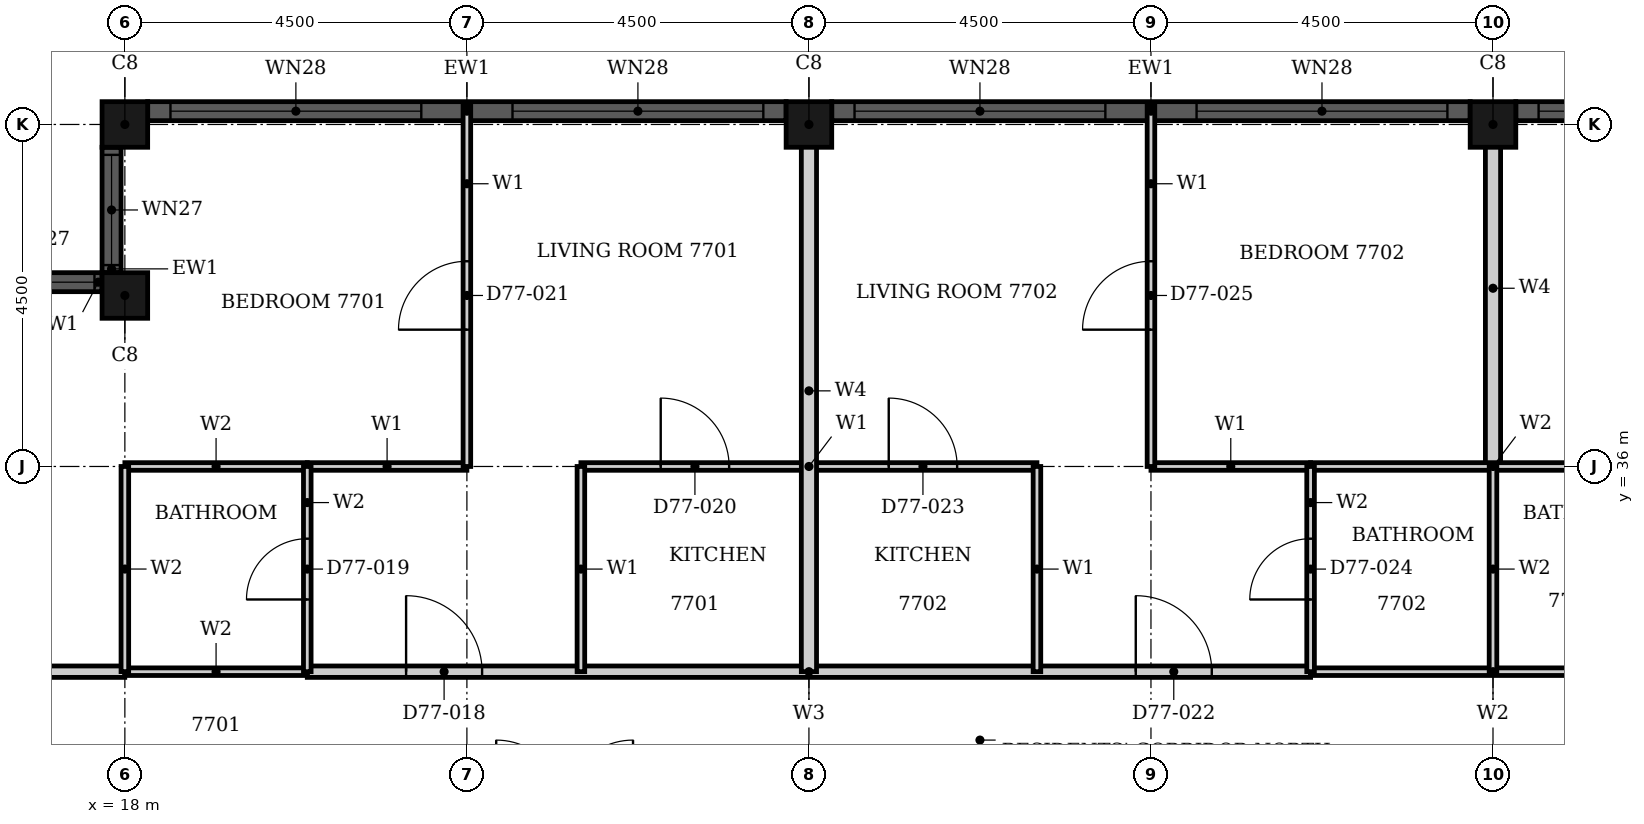
"""IFC4 building model, lengths in metres.
Left out: names, types, materials, properties, quantities, classifications, styles, units other than length and angle.
Written with IfcOpenShell. Run it as: python <this file> out.ifc"""

import sys

from ifc_helpers import new_model, si_unit, direction, frame, frame_2d, origin, origin_2d, place, context, subcontext, project, spatial, rectangle, hollow_rectangle, extrude, element, fill, save


model = new_model("IFC4")
c1 = context("Model", 3, precision=1e-05, world=origin(), true_north=direction((0.0, 1.0)))
c2 = subcontext(c1, "Body", "Model", "MODEL_VIEW")
j1 = project(units=[si_unit("LENGTHUNIT", "METRE"), si_unit("PLANEANGLEUNIT", "RADIAN")], contexts=[c1])
p1 = place(None, origin())
s1 = spatial("IfcSite", under=j1, at=p1, CompositionType="ELEMENT")
p2 = place(p1, origin())
s2 = spatial("IfcBuilding", under=s1, at=p2, CompositionType="ELEMENT")
p3 = place(p2, frame((0.0, 0.0, 301.9)))
s3 = spatial("IfcBuildingStorey", under=s2, at=p3, CompositionType="ELEMENT", Elevation=301.9)
for number, where, z_axis, x_axis in (
    (1, (36.0, 40.5, 0.0), (0.0, 0.0, 1.0), (1.0, 0.0, 0.0)),
    (2, (27.0, 40.5, 0.0), (0.0, 0.0, 1.0), (1.0, 0.0, 0.0)),
    (3, (18.0, 40.5, 0.0), (0.0, 0.0, 1.0), (1.0, 0.0, 0.0)),
    (4, (18.0, 38.25, 0.0), (0.0, 0.0, 1.0), (1.0, 0.0, 0.0)),
):
    element("IfcColumn", number, at=place(p3, frame(where, z_axis=z_axis, x_axis=x_axis)), inside=s3, PredefinedType="COLUMN", context=c2, shape_type="SweptSolid", body=[
        extrude(hollow_rectangle(XDim=0.6, YDim=0.6, WallThickness=0.02, at=origin_2d()), origin(), (0.0, 0.0, 1.0), 3.7),
    ])
p4 = place(p3, frame((44.7, 40.675, 0.0), z_axis=(0.0, 0.0, 1.0), x_axis=(-1.0, 0.0, 0.0)))
e5 = element("IfcWall", 5, at=p4, inside=s3, PredefinedType="SOLIDWALL", context=c2, shape_type="SweptSolid", body=[
    extrude(rectangle(XDim=8.4, YDim=0.25, at=frame_2d((4.2, 0.0))), origin(), (0.0, 0.0, 1.0), 3.7),
])
p5 = place(p4, frame((0.3, 0.0, 0.45)))
e6 = element("IfcOpeningElement", 6, at=p5, cuts=e5, PredefinedType="OPENING", context=c2, shape_type="SweptSolid", body=[
    extrude(rectangle(XDim=3.3, YDim=1.8, at=frame_2d((1.65, 0.9))), frame((0.0, 0.135, 0.0), z_axis=(0.0, -1.0, 0.0), x_axis=(1.0, 0.0, 0.0)), (0.0, 0.0, 1.0), 0.27),
])
p6 = place(p4, frame((4.8, 0.0, 0.45)))
e7 = element("IfcOpeningElement", 7, at=p6, cuts=e5, PredefinedType="OPENING", context=c2, shape_type="SweptSolid", body=[
    extrude(rectangle(XDim=3.3, YDim=1.8, at=frame_2d((1.65, 0.9))), frame((0.0, 0.135, 0.0), z_axis=(0.0, -1.0, 0.0), x_axis=(1.0, 0.0, 0.0)), (0.0, 0.0, 1.0), 0.27),
])
p7 = place(p3, frame((35.7, 40.675, 0.0), z_axis=(0.0, 0.0, 1.0), x_axis=(-1.0, 0.0, 0.0)))
e8 = element("IfcWall", 8, at=p7, inside=s3, PredefinedType="SOLIDWALL", context=c2, shape_type="SweptSolid", body=[
    extrude(rectangle(XDim=8.4, YDim=0.25, at=frame_2d((4.2, 0.0))), origin(), (0.0, 0.0, 1.0), 3.7),
])
p8 = place(p7, frame((0.3, 0.0, 0.45)))
e9 = element("IfcOpeningElement", 9, at=p8, cuts=e8, PredefinedType="OPENING", context=c2, shape_type="SweptSolid", body=[
    extrude(rectangle(XDim=3.3, YDim=1.8, at=frame_2d((1.65, 0.9))), frame((0.0, 0.135, 0.0), z_axis=(0.0, -1.0, 0.0), x_axis=(1.0, 0.0, 0.0)), (0.0, 0.0, 1.0), 0.27),
])
p9 = place(p7, frame((4.8, 0.0, 0.45)))
e10 = element("IfcOpeningElement", 10, at=p9, cuts=e8, PredefinedType="OPENING", context=c2, shape_type="SweptSolid", body=[
    extrude(rectangle(XDim=3.3, YDim=1.8, at=frame_2d((1.65, 0.9))), frame((0.0, 0.135, 0.0), z_axis=(0.0, -1.0, 0.0), x_axis=(1.0, 0.0, 0.0)), (0.0, 0.0, 1.0), 0.27),
])
p10 = place(p3, frame((26.7, 40.675, 0.0), z_axis=(0.0, 0.0, 1.0), x_axis=(-1.0, 0.0, 0.0)))
e11 = element("IfcWall", 11, at=p10, inside=s3, PredefinedType="SOLIDWALL", context=c2, shape_type="SweptSolid", body=[
    extrude(rectangle(XDim=8.4, YDim=0.25, at=frame_2d((4.2, 0.0))), origin(), (0.0, 0.0, 1.0), 3.7),
])
p11 = place(p10, frame((0.3, 0.0, 0.45)))
e12 = element("IfcOpeningElement", 12, at=p11, cuts=e11, PredefinedType="OPENING", context=c2, shape_type="SweptSolid", body=[
    extrude(rectangle(XDim=3.3, YDim=1.8, at=frame_2d((1.65, 0.9))), frame((0.0, 0.135, 0.0), z_axis=(0.0, -1.0, 0.0), x_axis=(1.0, 0.0, 0.0)), (0.0, 0.0, 1.0), 0.27),
])
p12 = place(p10, frame((4.8, 0.0, 0.45)))
e13 = element("IfcOpeningElement", 13, at=p12, cuts=e11, PredefinedType="OPENING", context=c2, shape_type="SweptSolid", body=[
    extrude(rectangle(XDim=3.3, YDim=1.8, at=frame_2d((1.65, 0.9))), frame((0.0, 0.135, 0.0), z_axis=(0.0, -1.0, 0.0), x_axis=(1.0, 0.0, 0.0)), (0.0, 0.0, 1.0), 0.27),
])
p13 = place(p3, frame((17.825, 40.2, 0.0), z_axis=(0.0, 0.0, 1.0), x_axis=(0.0, -1.0, 0.0)))
e14 = element("IfcWall", 14, at=p13, inside=s3, PredefinedType="SOLIDWALL", context=c2, shape_type="SweptSolid", body=[
    extrude(rectangle(XDim=1.65, YDim=0.25, at=frame_2d((0.825, 0.0))), origin(), (0.0, 0.0, 1.0), 3.7),
])
p14 = place(p13, frame((0.1, 0.0, 0.9)))
e15 = element("IfcOpeningElement", 15, at=p14, cuts=e14, PredefinedType="OPENING", context=c2, shape_type="SweptSolid", body=[
    extrude(rectangle(XDim=1.45, YDim=1.35, at=frame_2d((0.725, 0.675))), frame((0.0, 0.135, 0.0), z_axis=(0.0, -1.0, 0.0), x_axis=(1.0, 0.0, 0.0)), (0.0, 0.0, 1.0), 0.27),
])
p15 = place(p3, frame((17.7, 38.425, 0.0), z_axis=(0.0, 0.0, 1.0), x_axis=(-1.0, 0.0, 0.0)))
e16 = element("IfcWall", 16, at=p15, inside=s3, PredefinedType="SOLIDWALL", context=c2, shape_type="SweptSolid", body=[
    extrude(rectangle(XDim=1.65, YDim=0.25, at=frame_2d((0.825, 0.0))), origin(), (0.0, 0.0, 1.0), 3.7),
])
p16 = place(p15, frame((0.1, 0.0, 0.9)))
e17 = element("IfcOpeningElement", 17, at=p16, cuts=e16, PredefinedType="OPENING", context=c2, shape_type="SweptSolid", body=[
    extrude(rectangle(XDim=1.45, YDim=1.35, at=frame_2d((0.725, 0.675))), frame((0.0, 0.135, 0.0), z_axis=(0.0, -1.0, 0.0), x_axis=(1.0, 0.0, 0.0)), (0.0, 0.0, 1.0), 0.27),
])
p17 = place(p3, frame((13.45, 33.3, 0.0), z_axis=(0.0, 0.0, 1.0), x_axis=(1.0, 0.0, 0.0)))
e18 = element("IfcWall", 18, at=p17, inside=s3, PredefinedType="PARTITIONING", context=c2, shape_type="SweptSolid", body=[
    extrude(rectangle(XDim=4.549, YDim=0.15, at=frame_2d((2.274, 0.0))), origin(), (0.0, 0.0, 1.0), 3.2),
])
p18 = place(p3, frame((20.4, 33.3, 0.0), z_axis=(0.0, 0.0, 1.0), x_axis=(1.0, 0.0, 0.0)))
e19 = element("IfcWall", 19, at=p18, inside=s3, PredefinedType="PARTITIONING", context=c2, shape_type="SweptSolid", body=[
    extrude(rectangle(XDim=13.2, YDim=0.15, at=frame_2d((6.6, 0.0))), origin(), (0.0, 0.0, 1.0), 3.2),
])
p19 = place(p18, frame((1.3, 0.0, 0.0)))
e20 = element("IfcOpeningElement", 20, at=p19, cuts=e19, PredefinedType="OPENING", context=c2, shape_type="SweptSolid", body=[
    extrude(rectangle(XDim=1.0, YDim=2.2, at=frame_2d((0.5, 1.1))), frame((0.0, 0.085, 0.0), z_axis=(0.0, -1.0, 0.0), x_axis=(1.0, 0.0, 0.0)), (0.0, 0.0, 1.0), 0.17),
])
p20 = place(p18, frame((10.9, 0.0, 0.0)))
e21 = element("IfcOpeningElement", 21, at=p20, cuts=e19, PredefinedType="OPENING", context=c2, shape_type="SweptSolid", body=[
    extrude(rectangle(XDim=1.0, YDim=2.2, at=frame_2d((0.5, 1.1))), frame((0.0, 0.085, 0.0), z_axis=(0.0, -1.0, 0.0), x_axis=(1.0, 0.0, 0.0)), (0.0, 0.0, 1.0), 0.17),
])
p21 = place(p3, frame((20.4, 36.0, 0.0), z_axis=(0.0, 0.0, 1.0), x_axis=(1.0, 0.0, 0.0)))
e22 = element("IfcWall", 22, at=p21, inside=s3, PredefinedType="PARTITIONING", context=c2, shape_type="SweptSolid", body=[
    extrude(rectangle(XDim=2.1, YDim=0.1, at=frame_2d((1.05, 0.0))), origin(), (0.0, 0.0, 1.0), 3.2),
])
p22 = place(p3, frame((24.0, 36.0, 0.0), z_axis=(0.0, 0.0, 1.0), x_axis=(1.0, 0.0, 0.0)))
e23 = element("IfcWall", 23, at=p22, inside=s3, PredefinedType="PARTITIONING", context=c2, shape_type="SweptSolid", body=[
    extrude(rectangle(XDim=6.0, YDim=0.1, at=frame_2d((3.0, 0.0))), origin(), (0.0, 0.0, 1.0), 3.2),
])
p23 = place(p22, frame((1.05, 0.0, 0.0)))
e24 = element("IfcOpeningElement", 24, at=p23, cuts=e23, PredefinedType="OPENING", context=c2, shape_type="SweptSolid", body=[
    extrude(rectangle(XDim=0.9, YDim=2.1, at=frame_2d((0.45, 1.05))), frame((0.0, 0.06, 0.0), z_axis=(0.0, -1.0, 0.0), x_axis=(1.0, 0.0, 0.0)), (0.0, 0.0, 1.0), 0.12),
])
p24 = place(p22, frame((4.05, 0.0, 0.0)))
e25 = element("IfcOpeningElement", 25, at=p24, cuts=e23, PredefinedType="OPENING", context=c2, shape_type="SweptSolid", body=[
    extrude(rectangle(XDim=0.9, YDim=2.1, at=frame_2d((0.45, 1.05))), frame((0.0, 0.06, 0.0), z_axis=(0.0, -1.0, 0.0), x_axis=(1.0, 0.0, 0.0)), (0.0, 0.0, 1.0), 0.12),
])
p25 = place(p3, frame((31.5, 36.0, 0.0), z_axis=(0.0, 0.0, 1.0), x_axis=(1.0, 0.0, 0.0)))
e26 = element("IfcWall", 26, at=p25, inside=s3, PredefinedType="PARTITIONING", context=c2, shape_type="SweptSolid", body=[
    extrude(rectangle(XDim=2.1, YDim=0.1, at=frame_2d((1.05, 0.0))), origin(), (0.0, 0.0, 1.0), 3.2),
])
p26 = place(p3, frame((22.5, 36.0, 0.0), z_axis=(0.0, 0.0, 1.0), x_axis=(0.0, 1.0, 0.0)))
e27 = element("IfcWall", 27, at=p26, inside=s3, PredefinedType="PARTITIONING", context=c2, shape_type="SweptSolid", body=[
    extrude(rectangle(XDim=4.74, YDim=0.1, at=frame_2d((2.37, 0.0))), origin(), (0.0, 0.0, 1.0), 3.2),
])
p27 = place(p26, frame((1.8, 0.0, 0.0)))
e28 = element("IfcOpeningElement", 28, at=p27, cuts=e27, PredefinedType="OPENING", context=c2, shape_type="SweptSolid", body=[
    extrude(rectangle(XDim=0.9, YDim=2.1, at=frame_2d((0.45, 1.05))), frame((0.0, 0.06, 0.0), z_axis=(0.0, -1.0, 0.0), x_axis=(1.0, 0.0, 0.0)), (0.0, 0.0, 1.0), 0.12),
])
for number, where, z_axis, x_axis in (
    (29, (24.0, 33.3, 0.0), (0.0, 0.0, 1.0), (0.0, 1.0, 0.0)),
    (30, (30.0, 33.3, 0.0), (0.0, 0.0, 1.0), (0.0, 1.0, 0.0)),
):
    element("IfcWall", number, at=place(p3, frame(where, z_axis=z_axis, x_axis=x_axis)), inside=s3, PredefinedType="PARTITIONING", context=c2, shape_type="SweptSolid", body=[
        extrude(rectangle(XDim=2.7, YDim=0.1, at=frame_2d((1.35, 0.0))), origin(), (0.0, 0.0, 1.0), 3.2),
    ])
p28 = place(p3, frame((31.5, 36.0, 0.0), z_axis=(0.0, 0.0, 1.0), x_axis=(0.0, 1.0, 0.0)))
e31 = element("IfcWall", 31, at=p28, inside=s3, PredefinedType="PARTITIONING", context=c2, shape_type="SweptSolid", body=[
    extrude(rectangle(XDim=4.74, YDim=0.1, at=frame_2d((2.37, 0.0))), origin(), (0.0, 0.0, 1.0), 3.2),
])
p29 = place(p28, frame((1.8, 0.0, 0.0)))
e32 = element("IfcOpeningElement", 32, at=p29, cuts=e31, PredefinedType="OPENING", context=c2, shape_type="SweptSolid", body=[
    extrude(rectangle(XDim=0.9, YDim=2.1, at=frame_2d((0.45, 1.05))), frame((0.0, 0.06, 0.0), z_axis=(0.0, -1.0, 0.0), x_axis=(1.0, 0.0, 0.0)), (0.0, 0.0, 1.0), 0.12),
])
p30 = place(p3, frame((27.0, 33.3, 0.0), z_axis=(0.0, 0.0, 1.0), x_axis=(0.0, 1.0, 0.0)))
e33 = element("IfcWall", 33, at=p30, inside=s3, PredefinedType="PARTITIONING", context=c2, shape_type="SweptSolid", body=[
    extrude(rectangle(XDim=7.39, YDim=0.2, at=frame_2d((3.695, 0.0))), origin(), (0.0, 0.0, 1.0), 3.2),
])
p31 = place(p3, frame((36.0, 36.0, 0.0), z_axis=(0.0, 0.0, 1.0), x_axis=(0.0, 1.0, 0.0)))
e34 = element("IfcWall", 34, at=p31, inside=s3, PredefinedType="PARTITIONING", context=c2, shape_type="SweptSolid", body=[
    extrude(rectangle(XDim=4.69, YDim=0.2, at=frame_2d((2.345, 0.0))), origin(), (0.0, 0.0, 1.0), 3.2),
])
p32 = place(p3, frame((18.0, 33.3, 0.0), z_axis=(0.0, 0.0, 1.0), x_axis=(1.0, 0.0, 0.0)))
e35 = element("IfcWall", 35, at=p32, inside=s3, PredefinedType="PARTITIONING", context=c2, shape_type="SweptSolid", body=[
    extrude(rectangle(XDim=2.4, YDim=0.1, at=frame_2d((1.2, 0.0))), origin(), (0.0, 0.0, 1.0), 3.2),
])
p33 = place(p3, frame((33.6, 33.3, 0.0), z_axis=(0.0, 0.0, 1.0), x_axis=(1.0, 0.0, 0.0)))
e36 = element("IfcWall", 36, at=p33, inside=s3, PredefinedType="PARTITIONING", context=c2, shape_type="SweptSolid", body=[
    extrude(rectangle(XDim=4.8, YDim=0.1, at=frame_2d((2.4, 0.0))), origin(), (0.0, 0.0, 1.0), 3.2),
])
p34 = place(p3, frame((18.0, 36.0, 0.0), z_axis=(0.0, 0.0, 1.0), x_axis=(1.0, 0.0, 0.0)))
e37 = element("IfcWall", 37, at=p34, inside=s3, PredefinedType="PARTITIONING", context=c2, shape_type="SweptSolid", body=[
    extrude(rectangle(XDim=2.4, YDim=0.1, at=frame_2d((1.2, 0.0))), origin(), (0.0, 0.0, 1.0), 3.2),
])
p35 = place(p3, frame((33.6, 36.0, 0.0), z_axis=(0.0, 0.0, 1.0), x_axis=(1.0, 0.0, 0.0)))
e38 = element("IfcWall", 38, at=p35, inside=s3, PredefinedType="PARTITIONING", context=c2, shape_type="SweptSolid", body=[
    extrude(rectangle(XDim=4.8, YDim=0.1, at=frame_2d((2.4, 0.0))), origin(), (0.0, 0.0, 1.0), 3.2),
])
p36 = place(p3, frame((18.0, 33.301, 0.0), z_axis=(0.0, 0.0, 1.0), x_axis=(0.0, 1.0, 0.0)))
e39 = element("IfcWall", 39, at=p36, inside=s3, PredefinedType="PARTITIONING", context=c2, shape_type="SweptSolid", body=[
    extrude(rectangle(XDim=2.699, YDim=0.1, at=frame_2d((1.35, 0.0))), origin(), (0.0, 0.0, 1.0), 3.2),
])
p37 = place(p3, frame((20.4, 33.3, 0.0), z_axis=(0.0, 0.0, 1.0), x_axis=(0.0, 1.0, 0.0)))
e40 = element("IfcWall", 40, at=p37, inside=s3, PredefinedType="PARTITIONING", context=c2, shape_type="SweptSolid", body=[
    extrude(rectangle(XDim=2.7, YDim=0.1, at=frame_2d((1.35, 0.0))), origin(), (0.0, 0.0, 1.0), 3.2),
])
p38 = place(p37, frame((0.95, 0.0, 0.0)))
e41 = element("IfcOpeningElement", 41, at=p38, cuts=e40, PredefinedType="OPENING", context=c2, shape_type="SweptSolid", body=[
    extrude(rectangle(XDim=0.8, YDim=2.1, at=frame_2d((0.4, 1.05))), frame((0.0, 0.06, 0.0), z_axis=(0.0, -1.0, 0.0), x_axis=(1.0, 0.0, 0.0)), (0.0, 0.0, 1.0), 0.12),
])
p39 = place(p3, frame((33.6, 33.3, 0.0), z_axis=(0.0, 0.0, 1.0), x_axis=(0.0, 1.0, 0.0)))
e42 = element("IfcWall", 42, at=p39, inside=s3, PredefinedType="PARTITIONING", context=c2, shape_type="SweptSolid", body=[
    extrude(rectangle(XDim=2.7, YDim=0.1, at=frame_2d((1.35, 0.0))), origin(), (0.0, 0.0, 1.0), 3.2),
])
p40 = place(p39, frame((0.95, 0.0, 0.0)))
e43 = element("IfcOpeningElement", 43, at=p40, cuts=e42, PredefinedType="OPENING", context=c2, shape_type="SweptSolid", body=[
    extrude(rectangle(XDim=0.8, YDim=2.1, at=frame_2d((0.4, 1.05))), frame((0.0, 0.06, 0.0), z_axis=(0.0, -1.0, 0.0), x_axis=(1.0, 0.0, 0.0)), (0.0, 0.0, 1.0), 0.12),
])
p41 = place(p3, frame((36.0, 33.3, 0.0), z_axis=(0.0, 0.0, 1.0), x_axis=(0.0, 1.0, 0.0)))
e44 = element("IfcWall", 44, at=p41, inside=s3, PredefinedType="PARTITIONING", context=c2, shape_type="SweptSolid", body=[
    extrude(rectangle(XDim=2.7, YDim=0.1, at=frame_2d((1.35, 0.0))), origin(), (0.0, 0.0, 1.0), 3.2),
])
p42 = place(p6, origin())
e45 = element("IfcWindow", 45, at=p42, inside=s3, PartitioningType="SINGLE_PANEL", PredefinedType="WINDOW", context=c2, shape_type="SweptSolid", body=[
    extrude(rectangle(XDim=3.3, YDim=1.8, at=frame_2d((1.65, 0.9))), frame((0.0, 0.03, 0.0), z_axis=(0.0, -1.0, 0.0), x_axis=(1.0, 0.0, 0.0)), (0.0, 0.0, 1.0), 0.06),
])
fill(e7, e45)
p43 = place(p8, origin())
e46 = element("IfcWindow", 46, at=p43, inside=s3, PartitioningType="SINGLE_PANEL", PredefinedType="WINDOW", context=c2, shape_type="SweptSolid", body=[
    extrude(rectangle(XDim=3.3, YDim=1.8, at=frame_2d((1.65, 0.9))), frame((0.0, 0.03, 0.0), z_axis=(0.0, -1.0, 0.0), x_axis=(1.0, 0.0, 0.0)), (0.0, 0.0, 1.0), 0.06),
])
fill(e9, e46)
p44 = place(p9, origin())
e47 = element("IfcWindow", 47, at=p44, inside=s3, PartitioningType="SINGLE_PANEL", PredefinedType="WINDOW", context=c2, shape_type="SweptSolid", body=[
    extrude(rectangle(XDim=3.3, YDim=1.8, at=frame_2d((1.65, 0.9))), frame((0.0, 0.03, 0.0), z_axis=(0.0, -1.0, 0.0), x_axis=(1.0, 0.0, 0.0)), (0.0, 0.0, 1.0), 0.06),
])
fill(e10, e47)
p45 = place(p11, origin())
e48 = element("IfcWindow", 48, at=p45, inside=s3, PartitioningType="SINGLE_PANEL", PredefinedType="WINDOW", context=c2, shape_type="SweptSolid", body=[
    extrude(rectangle(XDim=3.3, YDim=1.8, at=frame_2d((1.65, 0.9))), frame((0.0, 0.03, 0.0), z_axis=(0.0, -1.0, 0.0), x_axis=(1.0, 0.0, 0.0)), (0.0, 0.0, 1.0), 0.06),
])
fill(e12, e48)
p46 = place(p12, origin())
e49 = element("IfcWindow", 49, at=p46, inside=s3, PartitioningType="SINGLE_PANEL", PredefinedType="WINDOW", context=c2, shape_type="SweptSolid", body=[
    extrude(rectangle(XDim=3.3, YDim=1.8, at=frame_2d((1.65, 0.9))), frame((0.0, 0.03, 0.0), z_axis=(0.0, -1.0, 0.0), x_axis=(1.0, 0.0, 0.0)), (0.0, 0.0, 1.0), 0.06),
])
fill(e13, e49)
p47 = place(p14, origin())
e50 = element("IfcWindow", 50, at=p47, inside=s3, PartitioningType="SINGLE_PANEL", PredefinedType="WINDOW", context=c2, shape_type="SweptSolid", body=[
    extrude(rectangle(XDim=1.45, YDim=1.35, at=frame_2d((0.725, 0.675))), frame((0.0, 0.03, 0.0), z_axis=(0.0, -1.0, 0.0), x_axis=(1.0, 0.0, 0.0)), (0.0, 0.0, 1.0), 0.06),
])
fill(e15, e50)
p48 = place(p16, origin())
e51 = element("IfcWindow", 51, at=p48, inside=s3, PartitioningType="SINGLE_PANEL", PredefinedType="WINDOW", context=c2, shape_type="SweptSolid", body=[
    extrude(rectangle(XDim=1.45, YDim=1.35, at=frame_2d((0.725, 0.675))), frame((0.0, 0.03, 0.0), z_axis=(0.0, -1.0, 0.0), x_axis=(1.0, 0.0, 0.0)), (0.0, 0.0, 1.0), 0.06),
])
fill(e17, e51)
p49 = place(p19, origin())
e52 = element("IfcDoor", 52, at=p49, inside=s3, OperationType="SINGLE_SWING_RIGHT", PredefinedType="DOOR", context=c2, shape_type="SweptSolid", body=[
    extrude(rectangle(XDim=1.0, YDim=2.2, at=frame_2d((0.5, 1.1))), frame((0.0, 0.025, 0.0), z_axis=(0.0, -1.0, 0.0), x_axis=(1.0, 0.0, 0.0)), (0.0, 0.0, 1.0), 0.05),
])
fill(e20, e52)
p50 = place(p38, origin())
e53 = element("IfcDoor", 53, at=p50, inside=s3, OperationType="SINGLE_SWING_LEFT", PredefinedType="DOOR", context=c2, shape_type="SweptSolid", body=[
    extrude(rectangle(XDim=0.8, YDim=2.1, at=frame_2d((0.4, 1.05))), frame((0.0, 0.025, 0.0), z_axis=(0.0, -1.0, 0.0), x_axis=(1.0, 0.0, 0.0)), (0.0, 0.0, 1.0), 0.05),
])
fill(e41, e53)
p51 = place(p23, origin())
e54 = element("IfcDoor", 54, at=p51, inside=s3, OperationType="SINGLE_SWING_LEFT", PredefinedType="DOOR", context=c2, shape_type="SweptSolid", body=[
    extrude(rectangle(XDim=0.9, YDim=2.1, at=frame_2d((0.45, 1.05))), frame((0.0, 0.025, 0.0), z_axis=(0.0, -1.0, 0.0), x_axis=(1.0, 0.0, 0.0)), (0.0, 0.0, 1.0), 0.05),
])
fill(e24, e54)
p52 = place(p27, origin())
e55 = element("IfcDoor", 55, at=p52, inside=s3, OperationType="SINGLE_SWING_RIGHT", PredefinedType="DOOR", context=c2, shape_type="SweptSolid", body=[
    extrude(rectangle(XDim=0.9, YDim=2.1, at=frame_2d((0.45, 1.05))), frame((0.0, 0.025, 0.0), z_axis=(0.0, -1.0, 0.0), x_axis=(1.0, 0.0, 0.0)), (0.0, 0.0, 1.0), 0.05),
])
fill(e28, e55)
p53 = place(p20, origin())
e56 = element("IfcDoor", 56, at=p53, inside=s3, OperationType="SINGLE_SWING_RIGHT", PredefinedType="DOOR", context=c2, shape_type="SweptSolid", body=[
    extrude(rectangle(XDim=1.0, YDim=2.2, at=frame_2d((0.5, 1.1))), frame((0.0, 0.025, 0.0), z_axis=(0.0, -1.0, 0.0), x_axis=(1.0, 0.0, 0.0)), (0.0, 0.0, 1.0), 0.05),
])
fill(e21, e56)
p54 = place(p24, origin())
e57 = element("IfcDoor", 57, at=p54, inside=s3, OperationType="SINGLE_SWING_RIGHT", PredefinedType="DOOR", context=c2, shape_type="SweptSolid", body=[
    extrude(rectangle(XDim=0.9, YDim=2.1, at=frame_2d((0.45, 1.05))), frame((0.0, 0.025, 0.0), z_axis=(0.0, -1.0, 0.0), x_axis=(1.0, 0.0, 0.0)), (0.0, 0.0, 1.0), 0.05),
])
fill(e25, e57)
p55 = place(p40, origin())
e58 = element("IfcDoor", 58, at=p55, inside=s3, OperationType="SINGLE_SWING_LEFT", PredefinedType="DOOR", context=c2, shape_type="SweptSolid", body=[
    extrude(rectangle(XDim=0.8, YDim=2.1, at=frame_2d((0.4, 1.05))), frame((0.0, 0.025, 0.0), z_axis=(0.0, -1.0, 0.0), x_axis=(1.0, 0.0, 0.0)), (0.0, 0.0, 1.0), 0.05),
])
fill(e43, e58)
p56 = place(p29, origin())
e59 = element("IfcDoor", 59, at=p56, inside=s3, OperationType="SINGLE_SWING_RIGHT", PredefinedType="DOOR", context=c2, shape_type="SweptSolid", body=[
    extrude(rectangle(XDim=0.9, YDim=2.1, at=frame_2d((0.45, 1.05))), frame((0.0, 0.025, 0.0), z_axis=(0.0, -1.0, 0.0), x_axis=(1.0, 0.0, 0.0)), (0.0, 0.0, 1.0), 0.05),
])
fill(e32, e59)
save(model, sys.argv[1])
